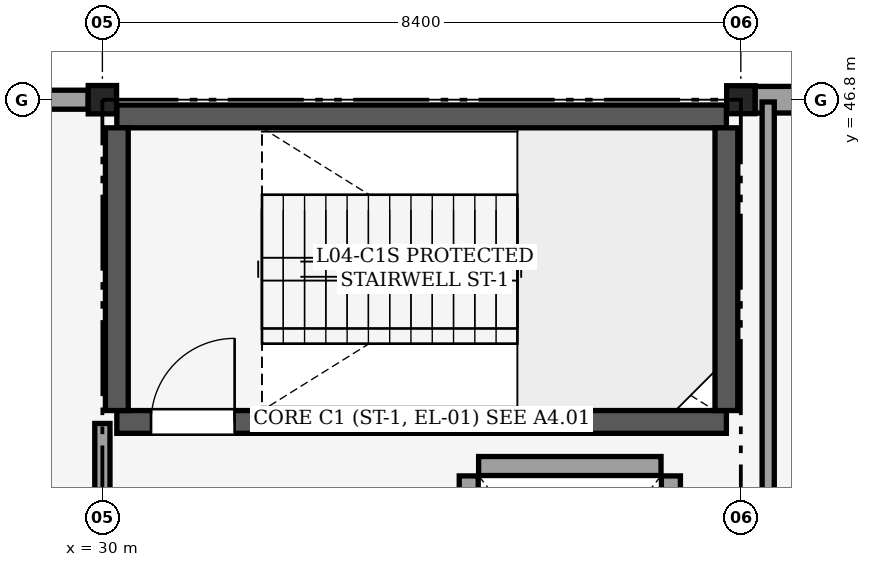
"""IFC4 building model, lengths in metres.
Left out: names, types, materials, properties, quantities, classifications, styles, units other than length and angle.
Written with IfcOpenShell. Run it as: python <this file> out.ifc"""

import sys

from ifc_helpers import new_model, si_unit, direction, frame, frame_2d, origin, origin_2d, place, context, subcontext, project, spatial, rectangle, i_section, extrude, element, fill, save


model = new_model("IFC4")
c1 = context("Model", 3, precision=1e-05, world=origin(), true_north=direction((0.0, 1.0)))
c2 = subcontext(c1, "Body", "Model", "MODEL_VIEW")
j1 = project(units=[si_unit("LENGTHUNIT", "METRE"), si_unit("PLANEANGLEUNIT", "RADIAN")], contexts=[c1])
p1 = place(None, origin())
s1 = spatial("IfcSite", under=j1, at=p1, CompositionType="ELEMENT")
p2 = place(p1, origin())
s2 = spatial("IfcBuilding", under=s1, at=p2, CompositionType="ELEMENT")
p3 = place(p2, frame((0.0, 0.0, 19.8)))
s3 = spatial("IfcBuildingStorey", under=s2, at=p3, CompositionType="ELEMENT", Elevation=19.8)
p4 = place(p3, frame((30.0, 46.8, 0.0), z_axis=(0.0, 0.0, 1.0), x_axis=(1.0, 0.0, 0.0)))
e1 = element("IfcColumn", 1, at=p4, inside=s3, PredefinedType="COLUMN", context=c2, shape_type="SweptSolid", body=[
    extrude(i_section(OverallWidth=0.373, OverallDepth=0.373, WebThickness=0.016, FlangeThickness=0.026, FilletRadius=0.025, at=origin_2d()), origin(), (0.0, 0.0, 1.0), 4.8),
])
p5 = place(p3, frame((38.4, 46.8, 0.0), z_axis=(0.0, 0.0, 1.0), x_axis=(1.0, 0.0, 0.0)))
e2 = element("IfcColumn", 2, at=p5, inside=s3, PredefinedType="COLUMN", context=c2, shape_type="SweptSolid", body=[
    extrude(i_section(OverallWidth=0.373, OverallDepth=0.368, WebThickness=0.015, FlangeThickness=0.024, FilletRadius=0.025, at=origin_2d()), origin(), (0.0, 0.0, 1.0), 4.8),
])
p6 = place(p3, frame((21.784, 46.8, 0.0), z_axis=(0.0, 0.0, 1.0), x_axis=(1.0, 0.0, 0.0)))
e3 = element("IfcWall", 3, at=p6, inside=s3, PredefinedType="SOLIDWALL", context=c2, shape_type="SweptSolid", body=[
    extrude(rectangle(XDim=8.03, YDim=0.25, at=frame_2d((4.015, 0.0))), origin(), (0.0, 0.0, 1.0), 4.58),
])
p7 = place(p6, frame((2.415, 0.0, 0.9)))
e4 = element("IfcOpeningElement", 4, at=p7, cuts=e3, PredefinedType="OPENING", context=c2, shape_type="SweptSolid", body=[
    extrude(rectangle(XDim=3.2, YDim=1.05, at=frame_2d((1.6, 0.525))), frame((0.0, 0.135, 0.0), z_axis=(0.0, -1.0, 0.0), x_axis=(1.0, 0.0, 0.0)), (0.0, 0.0, 1.0), 0.271),
])
p8 = place(p3, frame((38.586, 46.8, 0.0), z_axis=(0.0, 0.0, 1.0), x_axis=(1.0, 0.0, 0.0)))
e5 = element("IfcWall", 5, at=p8, inside=s3, PredefinedType="SOLIDWALL", context=c2, shape_type="SweptSolid", body=[
    extrude(rectangle(XDim=8.028, YDim=0.35, at=frame_2d((4.014, 0.0))), origin(), (0.0, 0.0, 1.0), 3.938),
])
p9 = place(p8, frame((2.214, 0.0, 0.9)))
e6 = element("IfcOpeningElement", 6, at=p9, cuts=e5, PredefinedType="OPENING", context=c2, shape_type="SweptSolid", body=[
    extrude(rectangle(XDim=3.6, YDim=1.05, at=frame_2d((1.8, 0.525))), frame((0.0, 0.185, 0.0), z_axis=(0.0, -1.0, 0.0), x_axis=(1.0, 0.0, 0.0)), (0.0, 0.0, 1.0), 0.371),
])
p10 = place(p3, frame((30.19, 42.56, 0.0), z_axis=(0.0, 0.0, 1.0), x_axis=(1.0, 0.0, 0.0)))
e7 = element("IfcWall", 7, at=p10, inside=s3, PredefinedType="SHEAR", context=c2, shape_type="SweptSolid", body=[
    extrude(rectangle(XDim=8.02, YDim=0.3, at=frame_2d((4.01, 0.0))), origin(), (0.0, 0.0, 1.0), 4.58),
])
p11 = place(p10, frame((0.45, 0.0, 0.0)))
e8 = element("IfcOpeningElement", 8, at=p11, cuts=e7, PredefinedType="OPENING", context=c2, shape_type="SweptSolid", body=[
    extrude(rectangle(XDim=1.1, YDim=2.15, at=frame_2d((0.55, 1.075))), frame((0.0, 0.16, 0.0), z_axis=(0.0, -1.0, 0.0), x_axis=(1.0, 0.0, 0.0)), (0.0, 0.0, 1.0), 0.321),
])
p12 = place(p3, frame((30.19, 46.58, 0.0), z_axis=(0.0, 0.0, 1.0), x_axis=(1.0, 0.0, 0.0)))
e9 = element("IfcWall", 9, at=p12, inside=s3, PredefinedType="SHEAR", context=c2, shape_type="SweptSolid", body=[
    extrude(rectangle(XDim=8.02, YDim=0.3, at=frame_2d((4.01, 0.0))), origin(), (0.0, 0.0, 1.0), 4.58),
])
for number, where, z_axis, x_axis in (
    (10, (30.19, 42.71, 0.0), (0.0, 0.0, 1.0), (0.0, 1.0, 0.0)),
    (11, (38.21, 42.71, 0.0), (0.0, 0.0, 1.0), (0.0, 1.0, 0.0)),
):
    element("IfcWall", number, at=place(p3, frame(where, z_axis=z_axis, x_axis=x_axis)), inside=s3, PredefinedType="SHEAR", context=c2, shape_type="SweptSolid", body=[
        extrude(rectangle(XDim=3.72, YDim=0.3, at=frame_2d((1.86, 0.0))), origin(), (0.0, 0.0, 1.0), 4.58),
    ])
p13 = place(p3, frame((37.48, 38.85, 0.0), z_axis=(0.0, 0.0, 1.0), x_axis=(0.0, 1.0, 0.0)))
e12 = element("IfcWall", 12, at=p13, inside=s3, PredefinedType="PARTITIONING", context=c2, shape_type="SweptSolid", body=[
    extrude(rectangle(XDim=3.0, YDim=0.25, at=frame_2d((1.5, 0.0))), origin(), (0.0, 0.0, 1.0), 4.58),
])
p14 = place(p3, frame((34.95, 41.98, 0.0), z_axis=(0.0, 0.0, 1.0), x_axis=(1.0, 0.0, 0.0)))
e13 = element("IfcWall", 13, at=p14, inside=s3, PredefinedType="PARTITIONING", context=c2, shape_type="SweptSolid", body=[
    extrude(rectangle(XDim=2.4, YDim=0.25, at=frame_2d((1.2, 0.0))), origin(), (0.0, 0.0, 1.0), 4.58),
])
p15 = place(p3, frame((34.82, 38.5, 0.0), z_axis=(0.0, 0.0, 1.0), x_axis=(0.0, 1.0, 0.0)))
e14 = element("IfcWall", 14, at=p15, inside=s3, PredefinedType="PARTITIONING", context=c2, shape_type="SweptSolid", body=[
    extrude(rectangle(XDim=3.35, YDim=0.25, at=frame_2d((1.675, 0.0))), origin(), (0.0, 0.0, 1.0), 4.58),
])
p16 = place(p15, frame((0.85, 0.0, 0.0)))
e15 = element("IfcOpeningElement", 15, at=p16, cuts=e14, PredefinedType="OPENING", context=c2, shape_type="SweptSolid", body=[
    extrude(rectangle(XDim=1.25, YDim=2.15, at=frame_2d((0.625, 1.075))), frame((0.0, 0.135, 0.0), z_axis=(0.0, -1.0, 0.0), x_axis=(1.0, 0.0, 0.0)), (0.0, 0.0, 1.0), 0.271),
])
p17 = place(p3, frame((30.0, 38.62, 0.0), z_axis=(0.0, 0.0, 1.0), x_axis=(0.0, 1.0, 0.0)))
e16 = element("IfcWall", 16, at=p17, inside=s3, PredefinedType="PARTITIONING", context=c2, shape_type="SweptSolid", body=[
    extrude(rectangle(XDim=3.92, YDim=0.2, at=frame_2d((1.96, 0.0))), origin(), (0.0, 0.0, 1.0), 3.867),
])
p18 = place(p3, frame((38.76, 38.41, 0.0), z_axis=(0.0, 0.0, 1.0), x_axis=(0.0, 1.0, 0.0)))
e17 = element("IfcWall", 17, at=p18, inside=s3, PredefinedType="PARTITIONING", context=c2, shape_type="SweptSolid", body=[
    extrude(rectangle(XDim=8.36, YDim=0.16, at=frame_2d((4.18, 0.0))), origin(), (0.0, 0.0, 1.0), 4.56),
])
p19 = place(p11, origin())
e18 = element("IfcDoor", 18, at=p19, inside=s3, OperationType="SINGLE_SWING_RIGHT", PredefinedType="DOOR", context=c2, shape_type="SweptSolid", body=[
    extrude(rectangle(XDim=1.1, YDim=2.15, at=frame_2d((0.55, 1.075))), frame((0.0, 0.025, 0.0), z_axis=(0.0, -1.0, 0.0), x_axis=(1.0, 0.0, 0.0)), (0.0, 0.0, 1.0), 0.05),
])
fill(e8, e18)
save(model, sys.argv[1])
